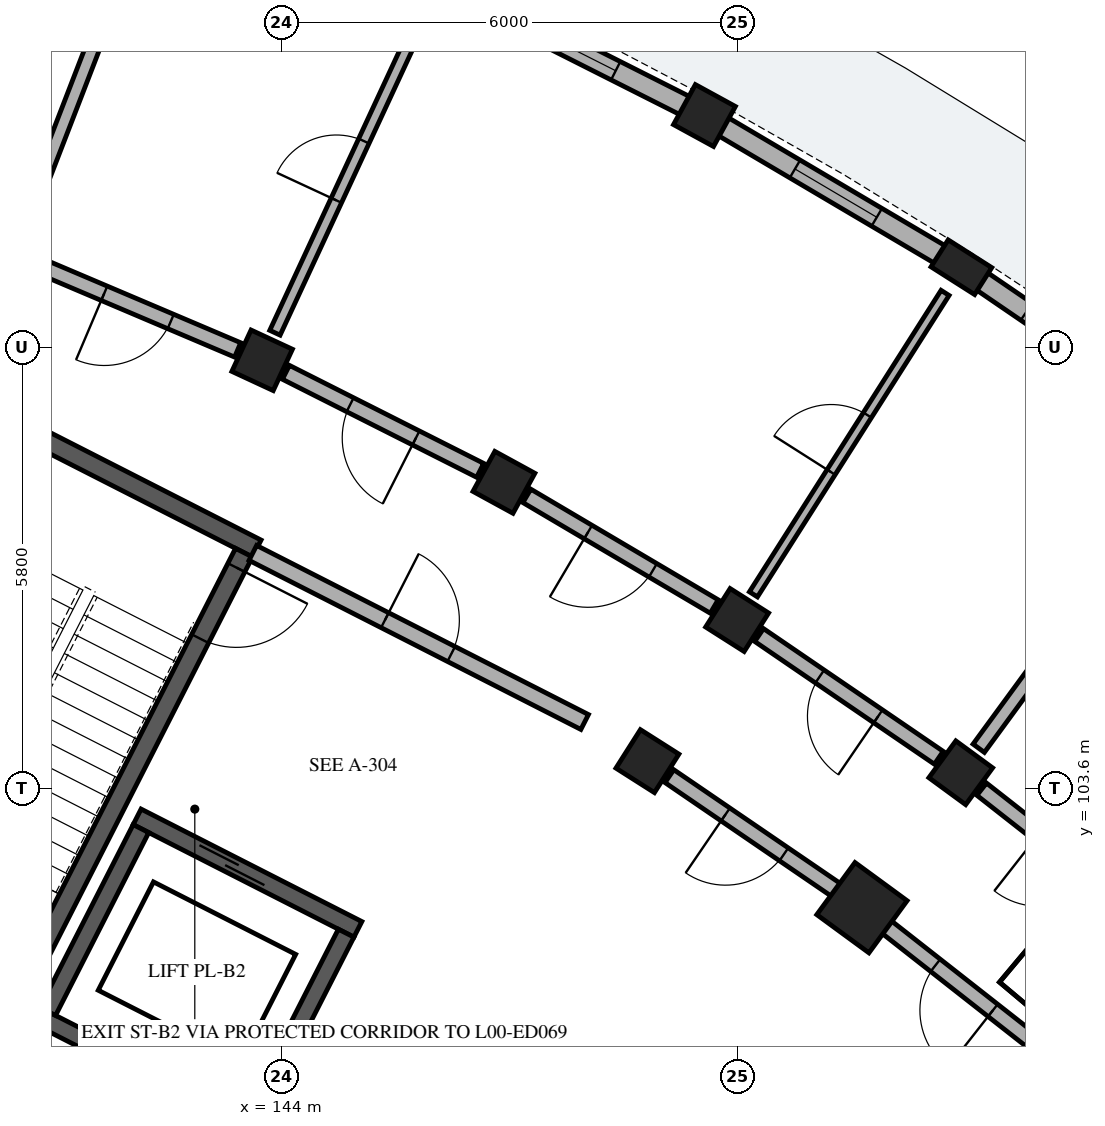
"""IFC4 building model, lengths in metres.
Left out: names, types, materials, properties, quantities, classifications, styles, units other than length and angle.
Written with IfcOpenShell. Run it as: python <this file> out.ifc"""

import sys

from ifc_helpers import new_model, si_unit, direction, frame, frame_2d, origin, origin_2d, place, context, subcontext, project, spatial, rectangle, extrude, element, fill, save


model = new_model("IFC4")
c1 = context("Model", 3, precision=1e-05, world=origin(), true_north=direction((0.0, 1.0)))
c2 = subcontext(c1, "Body", "Model", "MODEL_VIEW")
j1 = project(units=[si_unit("LENGTHUNIT", "METRE"), si_unit("PLANEANGLEUNIT", "RADIAN")], contexts=[c1])
p1 = place(None, origin())
s1 = spatial("IfcSite", under=j1, at=p1, CompositionType="ELEMENT")
p2 = place(p1, origin())
s2 = spatial("IfcBuilding", under=s1, at=p2, CompositionType="ELEMENT")
p3 = place(p2, origin())
s3 = spatial("IfcBuildingStorey", under=s2, at=p3, CompositionType="ELEMENT", Elevation=0.0)
p4 = place(p3, frame((140.629, 108.307, 0.0), z_axis=(0.0, 0.0, 1.0), x_axis=(0.891032414707, -0.453939683153, 0.0)))
e1 = element("IfcWall", 1, at=p4, inside=s3, PredefinedType="SHEAR", context=c2, shape_type="SweptSolid", body=[
    extrude(rectangle(XDim=3.42, YDim=0.25, at=frame_2d((1.71, 0.0))), origin(), (0.0, 0.0, 1.0), 4.48),
])
p5 = place(p3, frame((143.509, 106.699, 0.0), z_axis=(0.0, 0.0, 1.0), x_axis=(-0.453992276384, -0.891005618941, 0.0)))
e2 = element("IfcWall", 2, at=p5, inside=s3, PredefinedType="SHEAR", context=c2, shape_type="SweptSolid", body=[
    extrude(rectangle(XDim=6.6, YDim=0.25, at=frame_2d((3.3, 0.0))), origin(), (0.0, 0.0, 1.0), 4.48),
])
p6 = place(p5, frame((0.22, 0.0, 0.0)))
e3 = element("IfcOpeningElement", 3, at=p6, cuts=e2, PredefinedType="OPENING", context=c2, shape_type="SweptSolid", body=[
    extrude(rectangle(XDim=1.05, YDim=2.15, at=frame_2d((0.525, 1.075))), frame((0.0, 0.135, 0.0), z_axis=(0.0, -1.0, 0.0), x_axis=(1.0, 0.0, 0.0)), (0.0, 0.0, 1.0), 0.27),
])
p7 = place(p3, frame((142.103, 103.224, 0.0), z_axis=(0.0, 0.0, 1.0), x_axis=(0.891001200497, -0.454000947921, 0.0)))
e4 = element("IfcWall", 4, at=p7, inside=s3, PredefinedType="SHEAR", context=c2, shape_type="SweptSolid", body=[
    extrude(rectangle(XDim=3.26, YDim=0.23, at=frame_2d((1.63, 0.0))), origin(), (0.0, 0.0, 1.0), 4.48),
])
p8 = place(p7, frame((0.9, 0.0, 0.0)))
e5 = element("IfcOpeningElement", 5, at=p8, cuts=e4, PredefinedType="OPENING", context=c2, shape_type="SweptSolid", body=[
    extrude(rectangle(XDim=1.0, YDim=2.15, at=frame_2d((0.5, 1.075))), frame((0.0, 0.125, 0.0), z_axis=(0.0, -1.0, 0.0), x_axis=(1.0, 0.0, 0.0)), (0.0, 0.0, 1.0), 0.25),
])
p9 = place(p3, frame((140.772, 100.613, 0.0), z_axis=(0.0, 0.0, 1.0), x_axis=(0.891016635648, -0.453970654337, 0.0)))
e6 = element("IfcWall", 6, at=p9, inside=s3, PredefinedType="SHEAR", context=c2, shape_type="SweptSolid", body=[
    extrude(rectangle(XDim=3.26, YDim=0.23, at=frame_2d((1.63, 0.0))), origin(), (0.0, 0.0, 1.0), 4.48),
])
for number, where, z_axis, x_axis in (
    (7, (142.153, 103.069, 0.0), (0.0, 0.0, 1.0), (-0.454, -0.891, 0.0)),
    (8, (144.853, 101.694, 0.0), (0.0, 0.0, 1.0), (-0.454, -0.891, 0.0)),
):
    element("IfcWall", number, at=place(p3, frame(where, z_axis=z_axis, x_axis=x_axis)), inside=s3, PredefinedType="SHEAR", context=c2, shape_type="SweptSolid", body=[
        extrude(rectangle(XDim=2.7, YDim=0.23, at=frame_2d((1.35, 0.0))), origin(), (0.0, 0.0, 1.0), 4.48),
    ])
p10 = place(p3, frame((151.639, 102.029, 0.0), z_axis=(0.0, 0.0, 1.0), x_axis=(0.590918572221, 0.806731207407, 0.0)))
e9 = element("IfcColumn", 9, at=p10, inside=s3, PredefinedType="COLUMN", context=c2, shape_type="SweptSolid", body=[
    extrude(rectangle(XDim=0.85, YDim=0.85, at=origin_2d()), origin(), (0.0, 0.0, 1.0), 4.485),
])
for number, where, z_axis, x_axis in (
    (10, (152.939, 103.804, 0.0), (0.0, 0.0, 1.0), (0.591, 0.807, 0.0)),
    (11, (148.817, 103.957, 0.0), (0.0, 0.0, 1.0), (0.536, 0.844, 0.0)),
    (12, (149.997, 105.813, 0.0), (0.0, 0.0, 1.0), (0.536, 0.844, 0.0)),
):
    element("IfcColumn", number, at=place(p3, frame(where, z_axis=z_axis, x_axis=x_axis)), inside=s3, PredefinedType="COLUMN", context=c2, shape_type="SweptSolid", body=[
        extrude(rectangle(XDim=0.6, YDim=0.6, at=origin_2d()), origin(), (0.0, 0.0, 1.0), 4.485),
    ])
p11 = place(p3, frame((152.948, 110.455, 0.0), z_axis=(0.0, 0.0, 1.0), x_axis=(0.536481544469, 0.843912052553, 0.0)))
e13 = element("IfcColumn", 13, at=p11, inside=s3, PredefinedType="PILASTER", context=c2, shape_type="SweptSolid", body=[
    extrude(rectangle(XDim=0.42, YDim=0.68, at=origin_2d()), origin(), (0.0, 0.0, 1.0), 4.485),
])
for number, where, z_axis, x_axis in (
    (14, (146.928, 107.625, 0.0), (0.0, 0.0, 1.0), (0.48, 0.877, 0.0)),
    (15, (149.567, 112.451, 0.0), (0.0, 0.0, 1.0), (0.48, 0.877, 0.0)),
    (16, (143.748, 109.23, 0.0), (0.0, 0.0, 1.0), (0.421, 0.907, 0.0)),
):
    element("IfcColumn", number, at=place(p3, frame(where, z_axis=z_axis, x_axis=x_axis)), inside=s3, PredefinedType="COLUMN", context=c2, shape_type="SweptSolid", body=[
        extrude(rectangle(XDim=0.6, YDim=0.6, at=origin_2d()), origin(), (0.0, 0.0, 1.0), 4.485),
    ])
p12 = place(p3, frame((155.966, 108.393, 0.0), z_axis=(0.0, 0.0, 1.0), x_axis=(-0.825751510897, 0.564034078981, 0.0)))
e17 = element("IfcWall", 17, at=p12, inside=s3, PredefinedType="SOLIDWALL", context=c2, shape_type="SweptSolid", body=[
    extrude(rectangle(XDim=3.476, YDim=0.27, at=frame_2d((1.738, 0.0))), origin(), (0.0, 0.0, 1.0), 3.755),
])
p13 = place(p12, frame((0.858, 0.0, 0.55)))
e18 = element("IfcOpeningElement", 18, at=p13, cuts=e17, PredefinedType="OPENING", context=c2, shape_type="SweptSolid", body=[
    extrude(rectangle(XDim=1.76, YDim=1.635, at=frame_2d((0.88, 0.817))), frame((0.0, 0.145, 0.0), z_axis=(0.0, -1.0, 0.0), x_axis=(1.0, 0.0, 0.0)), (0.0, 0.0, 1.0), 0.29),
])
p14 = place(p3, frame((152.792, 110.546, 0.0), z_axis=(0.0, 0.0, 1.0), x_axis=(-0.861127819205, 0.50838851186, 0.0)))
e19 = element("IfcWall", 19, at=p14, inside=s3, PredefinedType="SOLIDWALL", context=c2, shape_type="SweptSolid", body=[
    extrude(rectangle(XDim=3.476, YDim=0.27, at=frame_2d((1.738, 0.0))), origin(), (0.0, 0.0, 1.0), 3.755),
])
p15 = place(p14, frame((1.113, 0.0, 0.55)))
e20 = element("IfcOpeningElement", 20, at=p15, cuts=e19, PredefinedType="OPENING", context=c2, shape_type="SweptSolid", body=[
    extrude(rectangle(XDim=1.25, YDim=1.6, at=frame_2d((0.625, 0.8))), frame((0.0, 0.145, 0.0), z_axis=(0.0, -1.0, 0.0), x_axis=(1.0, 0.0, 0.0)), (0.0, 0.0, 1.0), 0.29),
])
p16 = place(p3, frame((149.326, 112.572, 0.0), z_axis=(0.0, 0.0, 1.0), x_axis=(-0.89276335836, 0.450525899333, 0.0)))
e21 = element("IfcWall", 21, at=p16, inside=s3, PredefinedType="SOLIDWALL", context=c2, shape_type="SweptSolid", body=[
    extrude(rectangle(XDim=3.476, YDim=0.27, at=frame_2d((1.738, 0.0))), origin(), (0.0, 0.0, 1.0), 3.755),
])
p17 = place(p16, frame((1.038, 0.0, 0.55)))
e22 = element("IfcOpeningElement", 22, at=p17, cuts=e21, PredefinedType="OPENING", context=c2, shape_type="SweptSolid", body=[
    extrude(rectangle(XDim=1.4, YDim=1.65, at=frame_2d((0.7, 0.825))), frame((0.0, 0.145, 0.0), z_axis=(0.0, -1.0, 0.0), x_axis=(1.0, 0.0, 0.0)), (0.0, 0.0, 1.0), 0.29),
])
p18 = place(p3, frame((143.625, 106.696, 0.0), z_axis=(0.0, 0.0, 1.0), x_axis=(0.891003372311, -0.453996685595, 0.0)))
e23 = element("IfcWall", 23, at=p18, inside=s3, PredefinedType="PARTITIONING", context=c2, shape_type="SweptSolid", body=[
    extrude(rectangle(XDim=4.9, YDim=0.22, at=frame_2d((2.45, 0.0))), origin(), (0.0, 0.0, 1.0), 3.74),
])
p19 = place(p18, frame((1.95, 0.0, 0.0)))
e24 = element("IfcOpeningElement", 24, at=p19, cuts=e23, PredefinedType="OPENING", context=c2, shape_type="SweptSolid", body=[
    extrude(rectangle(XDim=0.98, YDim=2.14, at=frame_2d((0.49, 1.07))), frame((0.0, 0.12, 0.0), z_axis=(0.0, -1.0, 0.0), x_axis=(1.0, 0.0, 0.0)), (0.0, 0.0, 1.0), 0.24),
])
p20 = place(p3, frame((155.467, 101.821, 0.0), z_axis=(0.0, 0.0, 1.0), x_axis=(-0.786806323554, 0.617199975061, 0.0)))
e25 = element("IfcWall", 25, at=p20, inside=s3, PredefinedType="PARTITIONING", context=c2, shape_type="SweptSolid", body=[
    extrude(rectangle(XDim=2.863, YDim=0.205, at=frame_2d((1.432, 0.0))), origin(), (0.0, 0.0, 1.0), 3.1),
])
p21 = place(p20, frame((0.957, 0.0, 0.0)))
e26 = element("IfcOpeningElement", 26, at=p21, cuts=e25, PredefinedType="OPENING", context=c2, shape_type="SweptSolid", body=[
    extrude(rectangle(XDim=0.95, YDim=2.13, at=frame_2d((0.475, 1.065))), frame((0.0, 0.113, 0.0), z_axis=(0.0, -1.0, 0.0), x_axis=(1.0, 0.0, 0.0)), (0.0, 0.0, 1.0), 0.225),
])
p22 = place(p3, frame((154.053, 100.135, 0.0), z_axis=(0.0, 0.0, 1.0), x_axis=(-0.786835457019, 0.617162833924, 0.0)))
e27 = element("IfcWall", 27, at=p22, inside=s3, PredefinedType="PARTITIONING", context=c2, shape_type="SweptSolid", body=[
    extrude(rectangle(XDim=2.718, YDim=0.205, at=frame_2d((1.359, 0.0))), origin(), (0.0, 0.0, 1.0), 3.1),
])
p23 = place(p22, frame((0.879, 0.0, 0.0)))
e28 = element("IfcOpeningElement", 28, at=p23, cuts=e27, PredefinedType="OPENING", context=c2, shape_type="SweptSolid", body=[
    extrude(rectangle(XDim=0.96, YDim=2.1, at=frame_2d((0.48, 1.05))), frame((0.0, 0.113, 0.0), z_axis=(0.0, -1.0, 0.0), x_axis=(1.0, 0.0, 0.0)), (0.0, 0.0, 1.0), 0.225),
])
p24 = place(p3, frame((153.176, 104.126, 0.0), z_axis=(0.0, 0.0, 1.0), x_axis=(0.590910940129, 0.806736797745, 0.0)))
e29 = element("IfcWall", 29, at=p24, inside=s3, PredefinedType="PARTITIONING", context=c2, shape_type="SweptSolid", body=[
    extrude(rectangle(XDim=4.7, YDim=0.185, at=frame_2d((2.35, 0.0))), origin(), (0.0, 0.0, 1.0), 3.1),
])
p25 = place(p3, frame((152.65, 104.001, 0.0), z_axis=(0.0, 0.0, 1.0), x_axis=(-0.825779671787, 0.563992848947, 0.0)))
e30 = element("IfcWall", 30, at=p25, inside=s3, PredefinedType="PARTITIONING", context=c2, shape_type="SweptSolid", body=[
    extrude(rectangle(XDim=2.863, YDim=0.205, at=frame_2d((1.432, 0.0))), origin(), (0.0, 0.0, 1.0), 3.1),
])
p26 = place(p25, frame((0.967, 0.0, 0.0)))
e31 = element("IfcOpeningElement", 31, at=p26, cuts=e30, PredefinedType="OPENING", context=c2, shape_type="SweptSolid", body=[
    extrude(rectangle(XDim=0.93, YDim=2.12, at=frame_2d((0.465, 1.06))), frame((0.0, 0.113, 0.0), z_axis=(0.0, -1.0, 0.0), x_axis=(1.0, 0.0, 0.0)), (0.0, 0.0, 1.0), 0.225),
])
p27 = place(p3, frame((151.35, 102.226, 0.0), z_axis=(0.0, 0.0, 1.0), x_axis=(-0.825752009056, 0.56403334967, 0.0)))
e32 = element("IfcWall", 32, at=p27, inside=s3, PredefinedType="PARTITIONING", context=c2, shape_type="SweptSolid", body=[
    extrude(rectangle(XDim=2.718, YDim=0.205, at=frame_2d((1.359, 0.0))), origin(), (0.0, 0.0, 1.0), 3.1),
])
p28 = place(p27, frame((0.894, 0.0, 0.0)))
e33 = element("IfcOpeningElement", 33, at=p28, cuts=e32, PredefinedType="OPENING", context=c2, shape_type="SweptSolid", body=[
    extrude(rectangle(XDim=0.93, YDim=2.12, at=frame_2d((0.465, 1.06))), frame((0.0, 0.113, 0.0), z_axis=(0.0, -1.0, 0.0), x_axis=(1.0, 0.0, 0.0)), (0.0, 0.0, 1.0), 0.225),
])
p29 = place(p3, frame((150.211, 106.151, 0.0), z_axis=(0.0, 0.0, 1.0), x_axis=(0.536492262982, 0.843905238614, 0.0)))
e34 = element("IfcWall", 34, at=p29, inside=s3, PredefinedType="PARTITIONING", context=c2, shape_type="SweptSolid", body=[
    extrude(rectangle(XDim=4.7, YDim=0.125, at=frame_2d((2.35, 0.0))), origin(), (0.0, 0.0, 1.0), 3.1),
])
p30 = place(p29, frame((1.905, 0.0, 0.0)))
e35 = element("IfcOpeningElement", 35, at=p30, cuts=e34, PredefinedType="OPENING", context=c2, shape_type="SweptSolid", body=[
    extrude(rectangle(XDim=0.89, YDim=2.1, at=frame_2d((0.445, 1.05))), frame((0.0, 0.073, 0.0), z_axis=(0.0, -1.0, 0.0), x_axis=(1.0, 0.0, 0.0)), (0.0, 0.0, 1.0), 0.145),
])
p31 = place(p3, frame((149.695, 105.991, 0.0), z_axis=(0.0, 0.0, 1.0), x_axis=(-0.861113214678, 0.508413248753, 0.0)))
e36 = element("IfcWall", 36, at=p31, inside=s3, PredefinedType="PARTITIONING", context=c2, shape_type="SweptSolid", body=[
    extrude(rectangle(XDim=2.863, YDim=0.205, at=frame_2d((1.432, 0.0))), origin(), (0.0, 0.0, 1.0), 3.1),
])
p32 = place(p31, frame((0.937, 0.0, 0.0)))
e37 = element("IfcOpeningElement", 37, at=p32, cuts=e36, PredefinedType="OPENING", context=c2, shape_type="SweptSolid", body=[
    extrude(rectangle(XDim=0.99, YDim=2.16, at=frame_2d((0.495, 1.08))), frame((0.0, 0.113, 0.0), z_axis=(0.0, -1.0, 0.0), x_axis=(1.0, 0.0, 0.0)), (0.0, 0.0, 1.0), 0.225),
])
p33 = place(p3, frame((146.616, 107.782, 0.0), z_axis=(0.0, 0.0, 1.0), x_axis=(-0.89273239336, 0.450587254419, 0.0)))
e38 = element("IfcWall", 38, at=p33, inside=s3, PredefinedType="PARTITIONING", context=c2, shape_type="SweptSolid", body=[
    extrude(rectangle(XDim=2.863, YDim=0.205, at=frame_2d((1.432, 0.0))), origin(), (0.0, 0.0, 1.0), 3.1),
])
p34 = place(p33, frame((0.947, 0.0, 0.0)))
e39 = element("IfcOpeningElement", 39, at=p34, cuts=e38, PredefinedType="OPENING", context=c2, shape_type="SweptSolid", body=[
    extrude(rectangle(XDim=0.97, YDim=2.15, at=frame_2d((0.485, 1.075))), frame((0.0, 0.113, 0.0), z_axis=(0.0, -1.0, 0.0), x_axis=(1.0, 0.0, 0.0)), (0.0, 0.0, 1.0), 0.225),
])
p35 = place(p3, frame((143.916, 109.593, 0.0), z_axis=(0.0, 0.0, 1.0), x_axis=(0.420862519045, 0.907124434718, 0.0)))
e40 = element("IfcWall", 40, at=p35, inside=s3, PredefinedType="PLUMBINGWALL", context=c2, shape_type="SweptSolid", body=[
    extrude(rectangle(XDim=4.7, YDim=0.15, at=frame_2d((2.35, 0.0))), origin(), (0.0, 0.0, 1.0), 3.1),
])
p36 = place(p35, frame((1.92, 0.0, 0.0)))
e41 = element("IfcOpeningElement", 41, at=p36, cuts=e40, PredefinedType="OPENING", context=c2, shape_type="SweptSolid", body=[
    extrude(rectangle(XDim=0.86, YDim=2.06, at=frame_2d((0.43, 1.03))), frame((0.0, 0.085, 0.0), z_axis=(0.0, -1.0, 0.0), x_axis=(1.0, 0.0, 0.0)), (0.0, 0.0, 1.0), 0.17),
])
p37 = place(p3, frame((143.425, 109.367, 0.0), z_axis=(0.0, 0.0, 1.0), x_axis=(-0.920511160294, 0.390716270168, 0.0)))
e42 = element("IfcWall", 42, at=p37, inside=s3, PredefinedType="PARTITIONING", context=c2, shape_type="SweptSolid", body=[
    extrude(rectangle(XDim=2.863, YDim=0.205, at=frame_2d((1.432, 0.0))), origin(), (0.0, 0.0, 1.0), 3.1),
])
p38 = place(p37, frame((0.957, 0.0, 0.0)))
e43 = element("IfcOpeningElement", 43, at=p38, cuts=e42, PredefinedType="OPENING", context=c2, shape_type="SweptSolid", body=[
    extrude(rectangle(XDim=0.95, YDim=2.13, at=frame_2d((0.475, 1.065))), frame((0.0, 0.113, 0.0), z_axis=(0.0, -1.0, 0.0), x_axis=(1.0, 0.0, 0.0)), (0.0, 0.0, 1.0), 0.225),
])
p39 = place(p3, frame((140.612, 110.996, 0.0), z_axis=(0.0, 0.0, 1.0), x_axis=(0.360186633854, 0.932880264982, 0.0)))
e44 = element("IfcWall", 44, at=p39, inside=s3, PredefinedType="PARTITIONING", context=c2, shape_type="SweptSolid", body=[
    extrude(rectangle(XDim=4.7, YDim=0.185, at=frame_2d((2.35, 0.0))), origin(), (0.0, 0.0, 1.0), 3.1),
])
p40 = place(p13, origin())
e45 = element("IfcWindow", 45, at=p40, inside=s3, PartitioningType="SINGLE_PANEL", PredefinedType="WINDOW", context=c2, shape_type="SweptSolid", body=[
    extrude(rectangle(XDim=1.76, YDim=1.635, at=frame_2d((0.88, 0.817))), frame((0.0, 0.03, 0.0), z_axis=(0.0, -1.0, 0.0), x_axis=(1.0, 0.0, 0.0)), (0.0, 0.0, 1.0), 0.06),
])
fill(e18, e45)
p41 = place(p15, origin())
e46 = element("IfcWindow", 46, at=p41, inside=s3, PartitioningType="SINGLE_PANEL", PredefinedType="WINDOW", context=c2, shape_type="SweptSolid", body=[
    extrude(rectangle(XDim=1.25, YDim=1.6, at=frame_2d((0.625, 0.8))), frame((0.0, 0.03, 0.0), z_axis=(0.0, -1.0, 0.0), x_axis=(1.0, 0.0, 0.0)), (0.0, 0.0, 1.0), 0.06),
])
fill(e20, e46)
p42 = place(p17, origin())
e47 = element("IfcWindow", 47, at=p42, inside=s3, PartitioningType="SINGLE_PANEL", PredefinedType="WINDOW", context=c2, shape_type="SweptSolid", body=[
    extrude(rectangle(XDim=1.4, YDim=1.65, at=frame_2d((0.7, 0.825))), frame((0.0, 0.03, 0.0), z_axis=(0.0, -1.0, 0.0), x_axis=(1.0, 0.0, 0.0)), (0.0, 0.0, 1.0), 0.06),
])
fill(e22, e47)
p43 = place(p6, origin())
e48 = element("IfcDoor", 48, at=p43, inside=s3, OperationType="SINGLE_SWING_LEFT", PredefinedType="DOOR", context=c2, shape_type="SweptSolid", body=[
    extrude(rectangle(XDim=1.05, YDim=2.15, at=frame_2d((0.525, 1.075))), frame((0.0, 0.025, 0.0), z_axis=(0.0, -1.0, 0.0), x_axis=(1.0, 0.0, 0.0)), (0.0, 0.0, 1.0), 0.05),
])
fill(e3, e48)
p44 = place(p8, origin())
e49 = element("IfcDoor", 49, at=p44, inside=s3, OperationType="DOUBLE_DOOR_SLIDING", PredefinedType="DOOR", context=c2, shape_type="SweptSolid", body=[
    extrude(rectangle(XDim=1.0, YDim=2.15, at=frame_2d((0.5, 1.075))), frame((0.0, 0.025, 0.0), z_axis=(0.0, -1.0, 0.0), x_axis=(1.0, 0.0, 0.0)), (0.0, 0.0, 1.0), 0.05),
])
fill(e5, e49)
p45 = place(p19, origin())
e50 = element("IfcDoor", 50, at=p45, inside=s3, OperationType="SINGLE_SWING_LEFT", PredefinedType="DOOR", context=c2, shape_type="SweptSolid", body=[
    extrude(rectangle(XDim=0.98, YDim=2.14, at=frame_2d((0.49, 1.07))), frame((0.0, 0.025, 0.0), z_axis=(0.0, -1.0, 0.0), x_axis=(1.0, 0.0, 0.0)), (0.0, 0.0, 1.0), 0.05),
])
fill(e24, e50)
p46 = place(p23, origin())
e51 = element("IfcDoor", 51, at=p46, inside=s3, OperationType="SINGLE_SWING_LEFT", PredefinedType="DOOR", context=c2, shape_type="SweptSolid", body=[
    extrude(rectangle(XDim=0.96, YDim=2.1, at=frame_2d((0.48, 1.05))), frame((0.0, 0.025, 0.0), z_axis=(0.0, -1.0, 0.0), x_axis=(1.0, 0.0, 0.0)), (0.0, 0.0, 1.0), 0.05),
])
fill(e28, e51)
p47 = place(p26, origin())
e52 = element("IfcDoor", 52, at=p47, inside=s3, OperationType="SINGLE_SWING_LEFT", PredefinedType="DOOR", context=c2, shape_type="SweptSolid", body=[
    extrude(rectangle(XDim=0.93, YDim=2.12, at=frame_2d((0.465, 1.06))), frame((0.0, 0.025, 0.0), z_axis=(0.0, -1.0, 0.0), x_axis=(1.0, 0.0, 0.0)), (0.0, 0.0, 1.0), 0.05),
])
fill(e31, e52)
p48 = place(p28, origin())
e53 = element("IfcDoor", 53, at=p48, inside=s3, OperationType="SINGLE_SWING_RIGHT", PredefinedType="DOOR", context=c2, shape_type="SweptSolid", body=[
    extrude(rectangle(XDim=0.93, YDim=2.12, at=frame_2d((0.465, 1.06))), frame((0.0, 0.025, 0.0), z_axis=(0.0, -1.0, 0.0), x_axis=(1.0, 0.0, 0.0)), (0.0, 0.0, 1.0), 0.05),
])
fill(e33, e53)
p49 = place(p30, origin())
e54 = element("IfcDoor", 54, at=p49, inside=s3, OperationType="SINGLE_SWING_LEFT", PredefinedType="DOOR", context=c2, shape_type="SweptSolid", body=[
    extrude(rectangle(XDim=0.89, YDim=2.1, at=frame_2d((0.445, 1.05))), frame((0.0, 0.025, 0.0), z_axis=(0.0, -1.0, 0.0), x_axis=(1.0, 0.0, 0.0)), (0.0, 0.0, 1.0), 0.05),
])
fill(e35, e54)
p50 = place(p32, origin())
e55 = element("IfcDoor", 55, at=p50, inside=s3, OperationType="SINGLE_SWING_RIGHT", PredefinedType="DOOR", context=c2, shape_type="SweptSolid", body=[
    extrude(rectangle(XDim=0.99, YDim=2.16, at=frame_2d((0.495, 1.08))), frame((0.0, 0.025, 0.0), z_axis=(0.0, -1.0, 0.0), x_axis=(1.0, 0.0, 0.0)), (0.0, 0.0, 1.0), 0.05),
])
fill(e37, e55)
p51 = place(p34, origin())
e56 = element("IfcDoor", 56, at=p51, inside=s3, OperationType="SINGLE_SWING_LEFT", PredefinedType="DOOR", context=c2, shape_type="SweptSolid", body=[
    extrude(rectangle(XDim=0.97, YDim=2.15, at=frame_2d((0.485, 1.075))), frame((0.0, 0.025, 0.0), z_axis=(0.0, -1.0, 0.0), x_axis=(1.0, 0.0, 0.0)), (0.0, 0.0, 1.0), 0.05),
])
fill(e39, e56)
p52 = place(p36, origin())
e57 = element("IfcDoor", 57, at=p52, inside=s3, OperationType="SINGLE_SWING_LEFT", PredefinedType="DOOR", context=c2, shape_type="SweptSolid", body=[
    extrude(rectangle(XDim=0.86, YDim=2.06, at=frame_2d((0.43, 1.03))), frame((0.0, 0.025, 0.0), z_axis=(0.0, -1.0, 0.0), x_axis=(1.0, 0.0, 0.0)), (0.0, 0.0, 1.0), 0.05),
])
fill(e41, e57)
p53 = place(p38, origin())
e58 = element("IfcDoor", 58, at=p53, inside=s3, OperationType="SINGLE_SWING_RIGHT", PredefinedType="DOOR", context=c2, shape_type="SweptSolid", body=[
    extrude(rectangle(XDim=0.95, YDim=2.13, at=frame_2d((0.475, 1.065))), frame((0.0, 0.025, 0.0), z_axis=(0.0, -1.0, 0.0), x_axis=(1.0, 0.0, 0.0)), (0.0, 0.0, 1.0), 0.05),
])
fill(e43, e58)
save(model, sys.argv[1])
